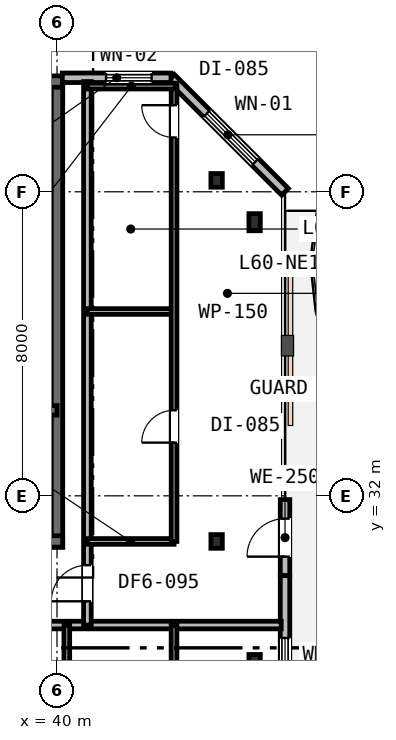
"""IFC4 building model, lengths in metres.
Left out: names, types, materials, properties, quantities, classifications, styles, units other than length and angle.
Written with IfcOpenShell. Run it as: python <this file> out.ifc"""

import sys

from ifc_helpers import new_model, si_unit, direction, frame, frame_2d, origin, origin_2d, place, context, subcontext, project, spatial, rectangle, i_section, extrude, element, fill, save


model = new_model("IFC4")
c1 = context("Model", 3, precision=1e-05, world=origin(), true_north=direction((0.0, 1.0)))
c2 = subcontext(c1, "Body", "Model", "MODEL_VIEW")
j1 = project(units=[si_unit("LENGTHUNIT", "METRE"), si_unit("PLANEANGLEUNIT", "RADIAN")], contexts=[c1])
p1 = place(None, origin())
s1 = spatial("IfcSite", under=j1, at=p1, CompositionType="ELEMENT")
p2 = place(p1, origin())
s2 = spatial("IfcBuilding", under=s1, at=p2, CompositionType="ELEMENT")
p3 = place(p2, frame((0.0, 0.0, 233.6)))
s3 = spatial("IfcBuildingStorey", under=s2, at=p3, CompositionType="ELEMENT", Elevation=233.6)
p4 = place(p3, frame((40.0, 30.65, 0.0), z_axis=(0.0, 0.0, 1.0), x_axis=(0.0, 1.0, 0.0)))
e1 = element("IfcWall", 1, at=p4, inside=s3, PredefinedType="SHEAR", context=c2, shape_type="SweptSolid", body=[
    extrude(rectangle(XDim=12.3, YDim=0.3, at=frame_2d((6.15, 0.0))), origin(), (0.0, 0.0, 1.0), 3.8),
])
p5 = place(p3, frame((15.85, 42.9, 0.0), z_axis=(0.0, 0.0, 1.0), x_axis=(1.0, 0.0, 0.0)))
e2 = element("IfcWall", 2, at=p5, inside=s3, PredefinedType="SHEAR", context=c2, shape_type="SweptSolid", body=[
    extrude(rectangle(XDim=24.3, YDim=0.3, at=frame_2d((12.15, 0.0))), origin(), (0.0, 0.0, 1.0), 3.8),
])
p6 = place(p3, frame((28.95, 30.8, 0.0), z_axis=(0.0, 0.0, 1.0), x_axis=(1.0, 0.0, 0.0)))
e3 = element("IfcWall", 3, at=p6, inside=s3, PredefinedType="SHEAR", context=c2, shape_type="SweptSolid", body=[
    extrude(rectangle(XDim=11.2, YDim=0.3, at=frame_2d((5.6, 0.0))), origin(), (0.0, 0.0, 1.0), 3.8),
])
p7 = place(p6, frame((7.65, 0.0, 0.0)))
e4 = element("IfcOpeningElement", 4, at=p7, cuts=e3, PredefinedType="OPENING", context=c2, shape_type="SweptSolid", body=[
    extrude(rectangle(XDim=1.1, YDim=2.15, at=frame_2d((0.55, 1.075))), frame((0.0, 0.16, 0.0), z_axis=(0.0, -1.0, 0.0), x_axis=(1.0, 0.0, 0.0)), (0.0, 0.0, 1.0), 0.32),
])
p8 = place(p3, frame((33.95, 34.25, 0.0), z_axis=(0.0, 0.0, 1.0), x_axis=(1.0, 0.0, 0.0)))
e5 = element("IfcWall", 5, at=p8, inside=s3, PredefinedType="SHEAR", context=c2, shape_type="SweptSolid", body=[
    extrude(rectangle(XDim=6.05, YDim=0.25, at=frame_2d((3.025, 0.0))), origin(), (0.0, 0.0, 1.0), 3.8),
])
p9 = place(p8, frame((3.7, 0.0, 0.0)))
e6 = element("IfcOpeningElement", 6, at=p9, cuts=e5, PredefinedType="OPENING", context=c2, shape_type="SweptSolid", body=[
    extrude(rectangle(XDim=1.0, YDim=2.15, at=frame_2d((0.5, 1.075))), frame((0.0, 0.135, 0.0), z_axis=(0.0, -1.0, 0.0), x_axis=(1.0, 0.0, 0.0)), (0.0, 0.0, 1.0), 0.27),
])
p10 = place(p8, frame((0.55, 0.0, 0.0)))
e7 = element("IfcOpeningElement", 7, at=p10, cuts=e5, PredefinedType="OPENING", context=c2, shape_type="SweptSolid", body=[
    extrude(rectangle(XDim=1.1, YDim=2.15, at=frame_2d((0.55, 1.075))), frame((0.0, 0.135, 0.0), z_axis=(0.0, -1.0, 0.0), x_axis=(1.0, 0.0, 0.0)), (0.0, 0.0, 1.0), 0.27),
])
for number, where, z_axis, x_axis in (
    (8, (45.2, 27.6, 0.0), (0.0, 0.0, 1.0), (1.0, 0.0, 0.0)),
    (9, (45.2, 39.2, 0.0), (0.0, 0.0, 1.0), (1.0, 0.0, 0.0)),
):
    element("IfcColumn", number, at=place(p3, frame(where, z_axis=z_axis, x_axis=x_axis)), inside=s3, PredefinedType="COLUMN", context=c2, shape_type="SweptSolid", body=[
        extrude(i_section(OverallWidth=0.3, OverallDepth=0.45, WebThickness=0.014, FlangeThickness=0.026, FilletRadius=0.027, at=origin_2d()), origin(), (0.0, 0.0, 1.0), 3.8),
    ])
for number, where, z_axis, x_axis in (
    (10, (44.2, 30.8, 0.0), (0.0, 0.0, 1.0), (1.0, 0.0, 0.0)),
    (11, (44.2, 40.3, 0.0), (0.0, 0.0, 1.0), (1.0, 0.0, 0.0)),
):
    element("IfcColumn", number, at=place(p3, frame(where, z_axis=z_axis, x_axis=x_axis)), inside=s3, PredefinedType="COLUMN", context=c2, shape_type="SweptSolid", body=[
        extrude(i_section(OverallWidth=0.3, OverallDepth=0.36, WebThickness=0.013, FlangeThickness=0.022, FilletRadius=0.027, at=origin_2d()), origin(), (0.0, 0.0, 1.0), 3.8),
    ])
p11 = place(p3, frame((46.0, 29.9, 0.0), z_axis=(0.0, 0.0, 1.0), x_axis=(0.0, 1.0, 0.0)))
e12 = element("IfcWall", 12, at=p11, inside=s3, PredefinedType="STANDARD", context=c2, shape_type="SweptSolid", body=[
    extrude(rectangle(XDim=2.0, YDim=0.25, at=frame_2d((1.0, 0.0))), origin(), (0.0, 0.0, 1.0), 3.53),
])
p12 = place(p11, frame((0.5, 0.0, 0.0)))
e13 = element("IfcOpeningElement", 13, at=p12, cuts=e12, PredefinedType="OPENING", context=c2, shape_type="SweptSolid", body=[
    extrude(rectangle(XDim=1.0, YDim=2.15, at=frame_2d((0.5, 1.075))), frame((0.0, 0.135, 0.0), z_axis=(0.0, -1.0, 0.0), x_axis=(1.0, 0.0, 0.0)), (0.0, 0.0, 1.0), 0.27),
])
p13 = place(p3, frame((46.0, 27.0, 0.0), z_axis=(0.0, 0.0, 1.0), x_axis=(0.0, 1.0, 0.0)))
e14 = element("IfcWall", 14, at=p13, inside=s3, PredefinedType="STANDARD", context=c2, shape_type="SweptSolid", body=[
    extrude(rectangle(XDim=2.9, YDim=0.25, at=frame_2d((1.45, 0.0))), origin(), (0.0, 0.0, 1.0), 3.53),
])
p14 = place(p13, frame((0.36, 0.0, 0.9)))
e15 = element("IfcOpeningElement", 15, at=p14, cuts=e14, PredefinedType="OPENING", context=c2, shape_type="SweptSolid", body=[
    extrude(rectangle(XDim=0.9, YDim=1.55, at=frame_2d((0.45, 0.775))), frame((0.0, 0.135, 0.0), z_axis=(0.0, -1.0, 0.0), x_axis=(1.0, 0.0, 0.0)), (0.0, 0.0, 1.0), 0.27),
])
p15 = place(p3, frame((46.0, 40.0, 0.0), z_axis=(0.0, 0.0, 1.0), x_axis=(-0.707106781187, 0.707106781187, 0.0)))
e16 = element("IfcWall", 16, at=p15, inside=s3, PredefinedType="STANDARD", context=c2, shape_type="SweptSolid", body=[
    extrude(rectangle(XDim=4.243, YDim=0.25, at=frame_2d((2.121, 0.0))), origin(), (0.0, 0.0, 1.0), 3.53),
])
p16 = place(p15, frame((1.111, 0.0, 0.75)))
e17 = element("IfcOpeningElement", 17, at=p16, cuts=e16, PredefinedType="OPENING", context=c2, shape_type="SweptSolid", body=[
    extrude(rectangle(XDim=1.8, YDim=1.85, at=frame_2d((0.9, 0.925))), frame((0.0, 0.135, 0.0), z_axis=(0.0, -1.0, 0.0), x_axis=(1.0, 0.0, 0.0)), (0.0, 0.0, 1.0), 0.27),
])
p17 = place(p3, frame((43.0, 43.0, 0.0), z_axis=(0.0, 0.0, 1.0), x_axis=(-1.0, 0.0, 0.0)))
e18 = element("IfcWall", 18, at=p17, inside=s3, PredefinedType="STANDARD", context=c2, shape_type="SweptSolid", body=[
    extrude(rectangle(XDim=2.86, YDim=0.25, at=frame_2d((1.43, 0.0))), origin(), (0.0, 0.0, 1.0), 3.53),
])
p18 = place(p17, frame((0.51, 0.0, 0.85)))
e19 = element("IfcOpeningElement", 19, at=p18, cuts=e18, PredefinedType="OPENING", context=c2, shape_type="SweptSolid", body=[
    extrude(rectangle(XDim=1.2, YDim=1.6, at=frame_2d((0.6, 0.8))), frame((0.0, 0.135, 0.0), z_axis=(0.0, -1.0, 0.0), x_axis=(1.0, 0.0, 0.0)), (0.0, 0.0, 1.0), 0.27),
])
p19 = place(p3, frame((20.2, 28.6, 0.0), z_axis=(0.0, 0.0, 1.0), x_axis=(1.0, 0.0, 0.0)))
e20 = element("IfcWall", 20, at=p19, inside=s3, PredefinedType="PARTITIONING", context=c2, shape_type="SweptSolid", body=[
    extrude(rectangle(XDim=25.7, YDim=0.2, at=frame_2d((12.85, 0.0))), origin(), (0.0, 0.0, 1.0), 2.92),
])
p20 = place(p19, frame((4.475, 0.0, 0.0)))
e21 = element("IfcOpeningElement", 21, at=p20, cuts=e20, PredefinedType="OPENING", context=c2, shape_type="SweptSolid", body=[
    extrude(rectangle(XDim=0.95, YDim=2.15, at=frame_2d((0.475, 1.075))), frame((0.0, 0.11, 0.0), z_axis=(0.0, -1.0, 0.0), x_axis=(1.0, 0.0, 0.0)), (0.0, 0.0, 1.0), 0.22),
])
p21 = place(p19, frame((10.875, 0.0, 0.0)))
e22 = element("IfcOpeningElement", 22, at=p21, cuts=e20, PredefinedType="OPENING", context=c2, shape_type="SweptSolid", body=[
    extrude(rectangle(XDim=0.95, YDim=2.15, at=frame_2d((0.475, 1.075))), frame((0.0, 0.11, 0.0), z_axis=(0.0, -1.0, 0.0), x_axis=(1.0, 0.0, 0.0)), (0.0, 0.0, 1.0), 0.22),
])
p22 = place(p19, frame((17.854, 0.0, 0.0)))
e23 = element("IfcOpeningElement", 23, at=p22, cuts=e20, PredefinedType="OPENING", context=c2, shape_type="SweptSolid", body=[
    extrude(rectangle(XDim=0.95, YDim=2.15, at=frame_2d((0.475, 1.075))), frame((0.0, 0.11, 0.0), z_axis=(0.0, -1.0, 0.0), x_axis=(1.0, 0.0, 0.0)), (0.0, 0.0, 1.0), 0.22),
])
p23 = place(p3, frame((40.8, 28.6, 0.0), z_axis=(0.0, 0.0, 1.0), x_axis=(0.0, 1.0, 0.0)))
e24 = element("IfcWall", 24, at=p23, inside=s3, PredefinedType="PARTITIONING", context=c2, shape_type="SweptSolid", body=[
    extrude(rectangle(XDim=14.3, YDim=0.2, at=frame_2d((7.15, 0.0))), origin(), (0.0, 0.0, 1.0), 2.92),
])
p24 = place(p23, frame((0.625, 0.0, 0.0)))
e25 = element("IfcOpeningElement", 25, at=p24, cuts=e24, PredefinedType="OPENING", context=c2, shape_type="SweptSolid", body=[
    extrude(rectangle(XDim=0.95, YDim=2.15, at=frame_2d((0.475, 1.075))), frame((0.0, 0.11, 0.0), z_axis=(0.0, -1.0, 0.0), x_axis=(1.0, 0.0, 0.0)), (0.0, 0.0, 1.0), 0.22),
])
p25 = place(p3, frame((40.8, 30.8, 0.0), z_axis=(0.0, 0.0, 1.0), x_axis=(1.0, 0.0, 0.0)))
e26 = element("IfcWall", 26, at=p25, inside=s3, PredefinedType="PARTITIONING", context=c2, shape_type="SweptSolid", body=[
    extrude(rectangle(XDim=2.28, YDim=0.15, at=frame_2d((1.14, 0.0))), origin(), (0.0, 0.0, 1.0), 2.92),
])
p26 = place(p3, frame((40.8, 36.85, 0.0), z_axis=(0.0, 0.0, 1.0), x_axis=(1.0, 0.0, 0.0)))
e27 = element("IfcWall", 27, at=p26, inside=s3, PredefinedType="PARTITIONING", context=c2, shape_type="SweptSolid", body=[
    extrude(rectangle(XDim=2.28, YDim=0.15, at=frame_2d((1.14, 0.0))), origin(), (0.0, 0.0, 1.0), 3.53),
])
p27 = place(p3, frame((43.08, 30.8, 0.0), z_axis=(0.0, 0.0, 1.0), x_axis=(0.0, 1.0, 0.0)))
e28 = element("IfcWall", 28, at=p27, inside=s3, PredefinedType="PARTITIONING", context=c2, shape_type="SweptSolid", body=[
    extrude(rectangle(XDim=12.02, YDim=0.15, at=frame_2d((6.01, 0.0))), origin(), (0.0, 0.0, 1.0), 2.92),
])
p28 = place(p27, frame((2.6, 0.0, 0.0)))
e29 = element("IfcOpeningElement", 29, at=p28, cuts=e28, PredefinedType="OPENING", context=c2, shape_type="SweptSolid", body=[
    extrude(rectangle(XDim=0.85, YDim=2.15, at=frame_2d((0.425, 1.075))), frame((0.0, 0.085, 0.0), z_axis=(0.0, -1.0, 0.0), x_axis=(1.0, 0.0, 0.0)), (0.0, 0.0, 1.0), 0.17),
])
p29 = place(p27, frame((10.629, 0.0, 0.0)))
e30 = element("IfcOpeningElement", 30, at=p29, cuts=e28, PredefinedType="OPENING", context=c2, shape_type="SweptSolid", body=[
    extrude(rectangle(XDim=0.85, YDim=2.15, at=frame_2d((0.425, 1.075))), frame((0.0, 0.085, 0.0), z_axis=(0.0, -1.0, 0.0), x_axis=(1.0, 0.0, 0.0)), (0.0, 0.0, 1.0), 0.17),
])
p30 = place(p3, frame((40.8, 42.78, 0.0), z_axis=(0.0, 0.0, 1.0), x_axis=(1.0, 0.0, 0.0)))
e31 = element("IfcWall", 31, at=p30, inside=s3, PredefinedType="PARTITIONING", context=c2, shape_type="SweptSolid", body=[
    extrude(rectangle(XDim=2.32, YDim=0.15, at=frame_2d((1.16, 0.0))), origin(), (0.0, 0.0, 1.0), 3.53),
])
for number, where, z_axis, x_axis in (
    (32, (40.258, 26.576, 0.0), (0.0, 0.0, 1.0), (0.0, 1.0, 0.0)),
    (33, (43.079, 26.576, 0.0), (0.0, 0.0, 1.0), (0.0, 1.0, 0.0)),
):
    element("IfcWall", number, at=place(p3, frame(where, z_axis=z_axis, x_axis=x_axis)), inside=s3, PredefinedType="PARTITIONING", context=c2, shape_type="SweptSolid", body=[
        extrude(rectangle(XDim=2.024, YDim=0.15, at=frame_2d((1.012, 0.0))), origin(), (0.0, 0.0, 1.0), 3.53),
    ])
p31 = place(p12, origin())
e34 = element("IfcDoor", 34, at=p31, inside=s3, OperationType="SINGLE_SWING_LEFT", PredefinedType="DOOR", context=c2, shape_type="SweptSolid", body=[
    extrude(rectangle(XDim=1.0, YDim=2.15, at=frame_2d((0.5, 1.075))), frame((0.0, 0.025, 0.0), z_axis=(0.0, -1.0, 0.0), x_axis=(1.0, 0.0, 0.0)), (0.0, 0.0, 1.0), 0.05),
])
fill(e13, e34)
p32 = place(p14, origin())
e35 = element("IfcWindow", 35, at=p32, inside=s3, PartitioningType="SINGLE_PANEL", PredefinedType="WINDOW", context=c2, shape_type="SweptSolid", body=[
    extrude(rectangle(XDim=0.9, YDim=1.55, at=frame_2d((0.45, 0.775))), frame((0.0, 0.03, 0.0), z_axis=(0.0, -1.0, 0.0), x_axis=(1.0, 0.0, 0.0)), (0.0, 0.0, 1.0), 0.06),
])
fill(e15, e35)
p33 = place(p16, origin())
e36 = element("IfcWindow", 36, at=p33, inside=s3, PartitioningType="SINGLE_PANEL", PredefinedType="WINDOW", context=c2, shape_type="SweptSolid", body=[
    extrude(rectangle(XDim=1.8, YDim=1.85, at=frame_2d((0.9, 0.925))), frame((0.0, 0.03, 0.0), z_axis=(0.0, -1.0, 0.0), x_axis=(1.0, 0.0, 0.0)), (0.0, 0.0, 1.0), 0.06),
])
fill(e17, e36)
p34 = place(p18, origin())
e37 = element("IfcWindow", 37, at=p34, inside=s3, PartitioningType="SINGLE_PANEL", PredefinedType="WINDOW", context=c2, shape_type="SweptSolid", body=[
    extrude(rectangle(XDim=1.2, YDim=1.6, at=frame_2d((0.6, 0.8))), frame((0.0, 0.03, 0.0), z_axis=(0.0, -1.0, 0.0), x_axis=(1.0, 0.0, 0.0)), (0.0, 0.0, 1.0), 0.06),
])
fill(e19, e37)
p35 = place(p24, origin())
e38 = element("IfcDoor", 38, at=p35, inside=s3, OperationType="SINGLE_SWING_LEFT", PredefinedType="DOOR", context=c2, shape_type="SweptSolid", body=[
    extrude(rectangle(XDim=0.95, YDim=2.15, at=frame_2d((0.475, 1.075))), frame((0.0, 0.025, 0.0), z_axis=(0.0, -1.0, 0.0), x_axis=(1.0, 0.0, 0.0)), (0.0, 0.0, 1.0), 0.05),
])
fill(e25, e38)
p36 = place(p28, origin())
e39 = element("IfcDoor", 39, at=p36, inside=s3, OperationType="SINGLE_SWING_LEFT", PredefinedType="DOOR", context=c2, shape_type="SweptSolid", body=[
    extrude(rectangle(XDim=0.85, YDim=2.15, at=frame_2d((0.425, 1.075))), frame((0.0, 0.025, 0.0), z_axis=(0.0, -1.0, 0.0), x_axis=(1.0, 0.0, 0.0)), (0.0, 0.0, 1.0), 0.05),
])
fill(e29, e39)
p37 = place(p29, origin())
e40 = element("IfcDoor", 40, at=p37, inside=s3, OperationType="SINGLE_SWING_RIGHT", PredefinedType="DOOR", context=c2, shape_type="SweptSolid", body=[
    extrude(rectangle(XDim=0.85, YDim=2.15, at=frame_2d((0.425, 1.075))), frame((0.0, 0.025, 0.0), z_axis=(0.0, -1.0, 0.0), x_axis=(1.0, 0.0, 0.0)), (0.0, 0.0, 1.0), 0.05),
])
fill(e30, e40)
save(model, sys.argv[1])
